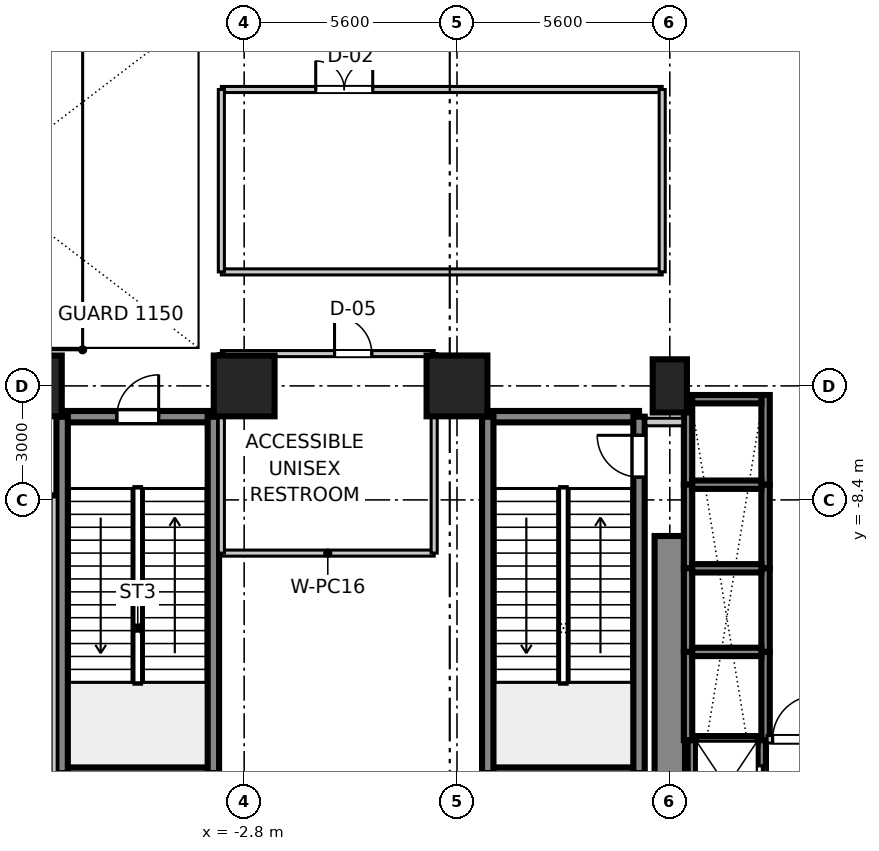
"""IFC4 building model, lengths in metres.
Left out: names, types, materials, properties, quantities, classifications, styles, units other than length and angle.
Written with IfcOpenShell. Run it as: python <this file> out.ifc"""

import sys

from ifc_helpers import new_model, si_unit, direction, frame, frame_2d, origin, origin_2d, place, context, subcontext, project, spatial, rectangle, extrude, source, transform, mapped, element, fill, save


model = new_model("IFC4")
c1 = context("Model", 3, precision=1e-05, world=origin(), true_north=direction((0.0, 1.0)))
c2 = subcontext(c1, "Body", "Model", "MODEL_VIEW")
j1 = project(units=[si_unit("LENGTHUNIT", "METRE"), si_unit("PLANEANGLEUNIT", "RADIAN")], contexts=[c1])
p1 = place(None, origin())
s1 = spatial("IfcSite", under=j1, at=p1, CompositionType="ELEMENT")
p2 = place(p1, origin())
s2 = spatial("IfcBuilding", under=s1, at=p2, CompositionType="ELEMENT")
p3 = place(p2, frame((0.0, 0.0, 5.4)))
s3 = spatial("IfcBuildingStorey", under=s2, at=p3, CompositionType="ELEMENT", Elevation=5.4)
m1 = source(origin(), c2, "Body", "SweptSolid", [
    extrude(rectangle(XDim=1.6, YDim=1.6, at=origin_2d()), origin(), (0.0, 0.0, 1.0), 5.355),
])
for number, where, z_axis, x_axis in (
    (1, (-8.4, -5.4, 0.0), (0.0, 0.0, 1.0), (1.0, 0.0, 0.0)),
    (2, (-2.8, -5.4, 0.0), (0.0, 0.0, 1.0), (1.0, 0.0, 0.0)),
    (3, (2.8, -5.4, 0.0), (0.0, 0.0, 1.0), (1.0, 0.0, 0.0)),
):
    element("IfcColumn", number, at=place(p3, frame(where, z_axis=z_axis, x_axis=x_axis)), inside=s3, PredefinedType="COLUMN", context=c2, shape_type="MappedRepresentation", body=[
        mapped(m1, transform((0.0, 0.0, 0.0), scale=1.0)),
    ])
m2 = source(origin(), c2, "Body", "SweptSolid", [
    extrude(rectangle(XDim=0.9, YDim=1.4, at=origin_2d()), origin(), (0.0, 0.0, 1.0), 5.355),
])
p4 = place(p3, frame((8.4, -5.4, 0.0), z_axis=(0.0, 0.0, 1.0), x_axis=(1.0, 0.0, 0.0)))
e4 = element("IfcColumn", 4, at=p4, inside=s3, PredefinedType="PILASTER", context=c2, shape_type="MappedRepresentation", body=[
    mapped(m2, transform((0.0, 0.0, 0.0), scale=1.0)),
])
m3 = source(origin(), c2, "Body", "SweptSolid", [
    extrude(rectangle(XDim=7.65, YDim=0.8, at=frame_2d((3.825, 0.0))), origin(), (0.0, 0.0, 1.0), 5.08),
])
p5 = place(p3, frame((8.4, -17.0, 0.0), z_axis=(0.0, 0.0, 1.0), x_axis=(0.0, 1.0, 0.0)))
e5 = element("IfcWall", 5, at=p5, inside=s3, PredefinedType="SHEAR", context=c2, shape_type="MappedRepresentation", body=[
    mapped(m3, transform((0.0, 0.0, 0.0), scale=1.0)),
])
m4 = source(origin(), c2, "Body", "SweptSolid", [
    extrude(rectangle(XDim=3.98, YDim=0.3, at=frame_2d((1.99, 0.0))), origin(), (0.0, 0.0, 1.0), 5.08),
])
for number, where, z_axis, x_axis in (
    (6, (3.61, -15.59, 0.0), (0.0, 0.0, 1.0), (1.0, 0.0, 0.0)),
    (7, (3.61, -6.21, 0.0), (0.0, 0.0, 1.0), (1.0, 0.0, 0.0)),
):
    element("IfcWall", number, at=place(p3, frame(where, z_axis=z_axis, x_axis=x_axis)), inside=s3, PredefinedType="SHEAR", context=c2, shape_type="MappedRepresentation", body=[
        mapped(m4, transform((0.0, 0.0, 0.0), scale=1.0)),
    ])
m5 = source(origin(), c2, "Body", "SweptSolid", [
    extrude(rectangle(XDim=9.38, YDim=0.3, at=frame_2d((4.69, 0.0))), origin(), (0.0, 0.0, 1.0), 5.08),
])
p6 = place(p3, frame((3.61, -15.59, 0.0), z_axis=(0.0, 0.0, 1.0), x_axis=(0.0, 1.0, 0.0)))
e8 = element("IfcWall", 8, at=p6, inside=s3, PredefinedType="SHEAR", context=c2, shape_type="MappedRepresentation", body=[
    mapped(m5, transform((0.0, 0.0, 0.0), scale=1.0)),
])
p7 = place(p3, frame((7.59, -15.59, 0.0), z_axis=(0.0, 0.0, 1.0), x_axis=(0.0, 1.0, 0.0)))
e9 = element("IfcWall", 9, at=p7, inside=s3, PredefinedType="SHEAR", context=c2, shape_type="MappedRepresentation", body=[
    mapped(m5, transform((0.0, 0.0, 0.0), scale=1.0)),
])
p8 = place(p7, frame((7.79, 0.0, 0.0)))
e10 = element("IfcOpeningElement", 10, at=p8, cuts=e9, PredefinedType="OPENING", context=c2, shape_type="SweptSolid", body=[
    extrude(rectangle(XDim=1.1, YDim=2.15, at=frame_2d((0.55, 1.075))), frame((0.0, 0.16, 0.0), z_axis=(0.0, -1.0, 0.0), x_axis=(1.0, 0.0, 0.0)), (0.0, 0.0, 1.0), 0.32),
])
p9 = place(p3, frame((-7.59, -15.59, 0.0), z_axis=(0.0, 0.0, 1.0), x_axis=(1.0, 0.0, 0.0)))
e11 = element("IfcWall", 11, at=p9, inside=s3, PredefinedType="SHEAR", context=c2, shape_type="MappedRepresentation", body=[
    mapped(m4, transform((0.0, 0.0, 0.0), scale=1.0)),
])
p10 = place(p3, frame((-7.59, -6.21, 0.0), z_axis=(0.0, 0.0, 1.0), x_axis=(1.0, 0.0, 0.0)))
e12 = element("IfcWall", 12, at=p10, inside=s3, PredefinedType="SHEAR", context=c2, shape_type="MappedRepresentation", body=[
    mapped(m4, transform((0.0, 0.0, 0.0), scale=1.0)),
])
p11 = place(p10, frame((1.44, 0.0, 0.0)))
e13 = element("IfcOpeningElement", 13, at=p11, cuts=e12, PredefinedType="OPENING", context=c2, shape_type="SweptSolid", body=[
    extrude(rectangle(XDim=1.1, YDim=2.15, at=frame_2d((0.55, 1.075))), frame((0.0, 0.16, 0.0), z_axis=(0.0, -1.0, 0.0), x_axis=(1.0, 0.0, 0.0)), (0.0, 0.0, 1.0), 0.32),
])
for number, where, z_axis, x_axis in (
    (14, (-7.59, -15.59, 0.0), (0.0, 0.0, 1.0), (0.0, 1.0, 0.0)),
    (15, (-3.61, -15.59, 0.0), (0.0, 0.0, 1.0), (0.0, 1.0, 0.0)),
):
    element("IfcWall", number, at=place(p3, frame(where, z_axis=z_axis, x_axis=x_axis)), inside=s3, PredefinedType="SHEAR", context=c2, shape_type="MappedRepresentation", body=[
        mapped(m5, transform((0.0, 0.0, 0.0), scale=1.0)),
    ])
m6 = source(origin(), c2, "Body", "SweptSolid", [
    extrude(rectangle(XDim=2.36, YDim=0.22, at=frame_2d((1.18, 0.0))), origin(), (0.0, 0.0, 1.0), 5.08),
])
for number, where, z_axis, x_axis in (
    (16, (8.88, -8.0, 0.0), (0.0, 0.0, 1.0), (0.0, 1.0, 0.0)),
    (17, (10.92, -8.0, 0.0), (0.0, 0.0, 1.0), (0.0, 1.0, 0.0)),
):
    element("IfcWall", number, at=place(p3, frame(where, z_axis=z_axis, x_axis=x_axis)), inside=s3, PredefinedType="SHEAR", context=c2, shape_type="MappedRepresentation", body=[
        mapped(m6, transform((0.0, 0.0, 0.0), scale=1.0)),
    ])
m7 = source(origin(), c2, "Body", "SweptSolid", [
    extrude(rectangle(XDim=1.82, YDim=0.22, at=frame_2d((0.91, 0.0))), origin(), (0.0, 0.0, 1.0), 5.08),
])
p12 = place(p3, frame((8.99, -5.75, 0.0), z_axis=(0.0, 0.0, 1.0), x_axis=(1.0, 0.0, 0.0)))
e18 = element("IfcWall", 18, at=p12, inside=s3, PredefinedType="SHEAR", context=c2, shape_type="MappedRepresentation", body=[
    mapped(m7, transform((0.0, 0.0, 0.0), scale=1.0)),
])
m8 = source(origin(), c2, "Body", "SweptSolid", [
    extrude(rectangle(XDim=2.2, YDim=0.22, at=frame_2d((1.1, 0.0))), origin(), (0.0, 0.0, 1.0), 5.08),
])
for number, where, z_axis, x_axis in (
    (19, (8.88, -10.2, 0.0), (0.0, 0.0, 1.0), (0.0, 1.0, 0.0)),
    (20, (10.92, -10.2, 0.0), (0.0, 0.0, 1.0), (0.0, 1.0, 0.0)),
):
    element("IfcWall", number, at=place(p3, frame(where, z_axis=z_axis, x_axis=x_axis)), inside=s3, PredefinedType="SHEAR", context=c2, shape_type="MappedRepresentation", body=[
        mapped(m8, transform((0.0, 0.0, 0.0), scale=1.0)),
    ])
m9 = source(origin(), c2, "Body", "SweptSolid", [
    extrude(rectangle(XDim=1.82, YDim=0.22, at=frame_2d((0.91, 0.0))), origin(), (0.0, 0.0, 1.0), 5.4),
])
p13 = place(p3, frame((8.99, -8.0, 0.0), z_axis=(0.0, 0.0, 1.0), x_axis=(1.0, 0.0, 0.0)))
e21 = element("IfcWall", 21, at=p13, inside=s3, PredefinedType="SHEAR", context=c2, shape_type="MappedRepresentation", body=[
    mapped(m9, transform((0.0, 0.0, 0.0), scale=1.0)),
])
for number, where, z_axis, x_axis in (
    (22, (8.88, -12.4, 0.0), (0.0, 0.0, 1.0), (0.0, 1.0, 0.0)),
    (23, (10.92, -12.4, 0.0), (0.0, 0.0, 1.0), (0.0, 1.0, 0.0)),
):
    element("IfcWall", number, at=place(p3, frame(where, z_axis=z_axis, x_axis=x_axis)), inside=s3, PredefinedType="SHEAR", context=c2, shape_type="MappedRepresentation", body=[
        mapped(m8, transform((0.0, 0.0, 0.0), scale=1.0)),
    ])
p14 = place(p3, frame((8.99, -10.2, 0.0), z_axis=(0.0, 0.0, 1.0), x_axis=(1.0, 0.0, 0.0)))
e24 = element("IfcWall", 24, at=p14, inside=s3, PredefinedType="SHEAR", context=c2, shape_type="MappedRepresentation", body=[
    mapped(m9, transform((0.0, 0.0, 0.0), scale=1.0)),
])
m10 = source(origin(), c2, "Body", "SweptSolid", [
    extrude(rectangle(XDim=2.325, YDim=0.22, at=frame_2d((1.163, 0.0))), origin(), (0.0, 0.0, 1.0), 5.08),
])
for number, where, z_axis, x_axis in (
    (25, (8.88, -14.725, 0.0), (0.0, 0.0, 1.0), (0.0, 1.0, 0.0)),
    (26, (10.92, -14.725, 0.0), (0.0, 0.0, 1.0), (0.0, 1.0, 0.0)),
):
    element("IfcWall", number, at=place(p3, frame(where, z_axis=z_axis, x_axis=x_axis)), inside=s3, PredefinedType="SHEAR", context=c2, shape_type="MappedRepresentation", body=[
        mapped(m10, transform((0.0, 0.0, 0.0), scale=1.0)),
    ])
p15 = place(p3, frame((8.99, -12.4, 0.0), z_axis=(0.0, 0.0, 1.0), x_axis=(1.0, 0.0, 0.0)))
e27 = element("IfcWall", 27, at=p15, inside=s3, PredefinedType="SHEAR", context=c2, shape_type="MappedRepresentation", body=[
    mapped(m9, transform((0.0, 0.0, 0.0), scale=1.0)),
])
m11 = source(origin(), c2, "Body", "SweptSolid", [
    extrude(rectangle(XDim=2.635, YDim=0.22, at=frame_2d((1.317, 0.0))), origin(), (0.0, 0.0, 1.0), 5.08),
])
p16 = place(p3, frame((8.98, -17.36, 0.0), z_axis=(0.0, 0.0, 1.0), x_axis=(0.0, 1.0, 0.0)))
e28 = element("IfcWall", 28, at=p16, inside=s3, PredefinedType="SHEAR", context=c2, shape_type="MappedRepresentation", body=[
    mapped(m11, transform((0.0, 0.0, 0.0), scale=1.0)),
])
p17 = place(p3, frame((10.82, -17.36, 0.0), z_axis=(0.0, 0.0, 1.0), x_axis=(0.0, 1.0, 0.0)))
e29 = element("IfcWall", 29, at=p17, inside=s3, PredefinedType="SHEAR", context=c2, shape_type="MappedRepresentation", body=[
    mapped(m11, transform((0.0, 0.0, 0.0), scale=1.0)),
])
p18 = place(p17, frame((0.86, 0.0, 0.0)))
e30 = element("IfcOpeningElement", 30, at=p18, cuts=e29, PredefinedType="OPENING", context=c2, shape_type="SweptSolid", body=[
    extrude(rectangle(XDim=1.1, YDim=2.2, at=frame_2d((0.55, 1.1))), frame((0.0, 0.12, 0.0), z_axis=(0.0, -1.0, 0.0), x_axis=(1.0, 0.0, 0.0)), (0.0, 0.0, 1.0), 0.24),
])
m12 = source(origin(), c2, "Body", "SweptSolid", [
    extrude(rectangle(XDim=1.62, YDim=0.22, at=frame_2d((0.81, 0.0))), origin(), (0.0, 0.0, 1.0), 5.4),
])
p19 = place(p3, frame((9.09, -14.725, 0.0), z_axis=(0.0, 0.0, 1.0), x_axis=(1.0, 0.0, 0.0)))
e31 = element("IfcWall", 31, at=p19, inside=s3, PredefinedType="SHEAR", context=c2, shape_type="MappedRepresentation", body=[
    mapped(m12, transform((0.0, 0.0, 0.0), scale=1.0)),
])
m13 = source(origin(), c2, "Body", "SweptSolid", [
    extrude(rectangle(XDim=1.46, YDim=0.2, at=frame_2d((0.73, 0.0))), origin(), (0.0, 0.0, 1.0), 3.4),
])
p20 = place(p3, frame((10.96, -14.7, 0.0), z_axis=(0.0, 0.0, 1.0), x_axis=(1.0, 0.0, 0.0)))
e32 = element("IfcWall", 32, at=p20, inside=s3, PredefinedType="PARTITIONING", context=c2, shape_type="MappedRepresentation", body=[
    mapped(m13, transform((0.0, 0.0, 0.0), scale=1.0)),
])
p21 = place(p20, frame((0.145, 0.0, 0.0)))
e33 = element("IfcOpeningElement", 33, at=p21, cuts=e32, PredefinedType="OPENING", context=c2, shape_type="SweptSolid", body=[
    extrude(rectangle(XDim=1.15, YDim=2.15, at=frame_2d((0.575, 1.075))), frame((0.0, 0.11, 0.0), z_axis=(0.0, -1.0, 0.0), x_axis=(1.0, 0.0, 0.0)), (0.0, 0.0, 1.0), 0.22),
])
m14 = source(origin(), c2, "Body", "SweptSolid", [
    extrude(rectangle(XDim=0.97, YDim=0.2, at=frame_2d((0.485, 0.0))), origin(), (0.0, 0.0, 1.0), 3.4),
])
p22 = place(p3, frame((7.77, -6.35, 0.0), z_axis=(0.0, 0.0, 1.0), x_axis=(1.0, 0.0, 0.0)))
e34 = element("IfcWall", 34, at=p22, inside=s3, PredefinedType="PARTITIONING", context=c2, shape_type="MappedRepresentation", body=[
    mapped(m14, transform((0.0, 0.0, 0.0), scale=1.0)),
])
m15 = source(origin(), c2, "Body", "SweptSolid", [
    extrude(rectangle(XDim=10.0, YDim=0.16, at=frame_2d((5.0, 0.0))), origin(), (0.0, 0.0, 1.0), 3.4),
])
p23 = place(p3, frame((-17.8, -8.32, 0.0), z_axis=(0.0, 0.0, 1.0), x_axis=(1.0, 0.0, 0.0)))
e35 = element("IfcWall", 35, at=p23, inside=s3, PredefinedType="PARTITIONING", context=c2, shape_type="MappedRepresentation", body=[
    mapped(m15, transform((0.0, 0.0, 0.0), scale=1.0)),
])
p24 = place(p23, frame((4.25, 0.0, 0.0)))
e36 = element("IfcOpeningElement", 36, at=p24, cuts=e35, PredefinedType="OPENING", context=c2, shape_type="SweptSolid", body=[
    extrude(rectangle(XDim=1.5, YDim=2.15, at=frame_2d((0.75, 1.075))), frame((0.0, 0.09, 0.0), z_axis=(0.0, -1.0, 0.0), x_axis=(1.0, 0.0, 0.0)), (0.0, 0.0, 1.0), 0.18),
])
m16 = source(origin(), c2, "Body", "SweptSolid", [
    extrude(rectangle(XDim=15.44, YDim=0.16, at=frame_2d((7.72, 0.0))), origin(), (0.0, 0.0, 1.0), 3.4),
])
p25 = place(p3, frame((-7.8, -23.76, 0.0), z_axis=(0.0, 0.0, 1.0), x_axis=(0.0, 1.0, 0.0)))
e37 = element("IfcWall", 37, at=p25, inside=s3, PredefinedType="PARTITIONING", context=c2, shape_type="MappedRepresentation", body=[
    mapped(m16, transform((0.0, 0.0, 0.0), scale=1.0)),
])
m17 = source(origin(), c2, "Body", "SweptSolid", [
    extrude(rectangle(XDim=11.6, YDim=0.16, at=frame_2d((5.8, 0.0))), origin(), (0.0, 0.0, 1.0), 3.4),
])
p26 = place(p3, frame((-3.4, -2.4, 0.0), z_axis=(0.0, 0.0, 1.0), x_axis=(1.0, 0.0, 0.0)))
e38 = element("IfcWall", 38, at=p26, inside=s3, PredefinedType="PARTITIONING", context=c2, shape_type="MappedRepresentation", body=[
    mapped(m17, transform((0.0, 0.0, 0.0), scale=1.0)),
])
p27 = place(p3, frame((-3.4, 2.4, 0.0), z_axis=(0.0, 0.0, 1.0), x_axis=(1.0, 0.0, 0.0)))
e39 = element("IfcWall", 39, at=p27, inside=s3, PredefinedType="PARTITIONING", context=c2, shape_type="MappedRepresentation", body=[
    mapped(m17, transform((0.0, 0.0, 0.0), scale=1.0)),
])
p28 = place(p27, frame((2.483, 0.0, 0.0)))
e40 = element("IfcOpeningElement", 40, at=p28, cuts=e39, PredefinedType="OPENING", context=c2, shape_type="SweptSolid", body=[
    extrude(rectangle(XDim=1.5, YDim=2.15, at=frame_2d((0.75, 1.075))), frame((0.0, 0.09, 0.0), z_axis=(0.0, -1.0, 0.0), x_axis=(1.0, 0.0, 0.0)), (0.0, 0.0, 1.0), 0.18),
])
m18 = source(origin(), c2, "Body", "SweptSolid", [
    extrude(rectangle(XDim=4.8, YDim=0.16, at=frame_2d((2.4, 0.0))), origin(), (0.0, 0.0, 1.0), 3.4),
])
for number, where, z_axis, x_axis in (
    (41, (-3.4, -2.4, 0.0), (0.0, 0.0, 1.0), (0.0, 1.0, 0.0)),
    (42, (8.2, -2.4, 0.0), (0.0, 0.0, 1.0), (0.0, 1.0, 0.0)),
):
    element("IfcWall", number, at=place(p3, frame(where, z_axis=z_axis, x_axis=x_axis)), inside=s3, PredefinedType="PARTITIONING", context=c2, shape_type="MappedRepresentation", body=[
        mapped(m18, transform((0.0, 0.0, 0.0), scale=1.0)),
    ])
m19 = source(origin(), c2, "Body", "SweptSolid", [
    extrude(rectangle(XDim=5.6, YDim=0.16, at=frame_2d((2.8, 0.0))), origin(), (0.0, 0.0, 1.0), 3.4),
])
p29 = place(p3, frame((-3.4, -9.8, 0.0), z_axis=(0.0, 0.0, 1.0), x_axis=(1.0, 0.0, 0.0)))
e43 = element("IfcWall", 43, at=p29, inside=s3, PredefinedType="PARTITIONING", context=c2, shape_type="MappedRepresentation", body=[
    mapped(m19, transform((0.0, 0.0, 0.0), scale=1.0)),
])
p30 = place(p3, frame((-3.4, -4.55, 0.0), z_axis=(0.0, 0.0, 1.0), x_axis=(1.0, 0.0, 0.0)))
e44 = element("IfcWall", 44, at=p30, inside=s3, PredefinedType="PARTITIONING", context=c2, shape_type="MappedRepresentation", body=[
    mapped(m19, transform((0.0, 0.0, 0.0), scale=1.0)),
])
p31 = place(p30, frame((2.978, 0.0, 0.0)))
e45 = element("IfcOpeningElement", 45, at=p31, cuts=e44, PredefinedType="OPENING", context=c2, shape_type="SweptSolid", body=[
    extrude(rectangle(XDim=0.98, YDim=2.1, at=frame_2d((0.49, 1.05))), frame((0.0, 0.09, 0.0), z_axis=(0.0, -1.0, 0.0), x_axis=(1.0, 0.0, 0.0)), (0.0, 0.0, 1.0), 0.18),
])
m20 = source(origin(), c2, "Body", "SweptSolid", [
    extrude(rectangle(XDim=5.25, YDim=0.16, at=frame_2d((2.625, 0.0))), origin(), (0.0, 0.0, 1.0), 3.4),
])
for number, where, z_axis, x_axis in (
    (46, (-3.4, -9.8, 0.0), (0.0, 0.0, 1.0), (0.0, 1.0, 0.0)),
    (47, (2.2, -9.8, 0.0), (0.0, 0.0, 1.0), (0.0, 1.0, 0.0)),
):
    element("IfcWall", number, at=place(p3, frame(where, z_axis=z_axis, x_axis=x_axis)), inside=s3, PredefinedType="PARTITIONING", context=c2, shape_type="MappedRepresentation", body=[
        mapped(m20, transform((0.0, 0.0, 0.0), scale=1.0)),
    ])
m21 = source(origin(), c2, "Body", "SweptSolid", [
    extrude(rectangle(XDim=1.1, YDim=2.15, at=frame_2d((0.55, 1.075))), frame((0.0, 0.025, 0.0), z_axis=(0.0, -1.0, 0.0), x_axis=(1.0, 0.0, 0.0)), (0.0, 0.0, 1.0), 0.05),
])
p32 = place(p8, origin())
e48 = element("IfcDoor", 48, at=p32, inside=s3, OperationType="SINGLE_SWING_RIGHT", PredefinedType="DOOR", context=c2, shape_type="MappedRepresentation", body=[
    mapped(m21, transform((0.0, 0.0, 0.0), scale=1.0)),
])
fill(e10, e48)
p33 = place(p11, frame((1.1, 0.0, 0.0), z_axis=(0.0, 0.0, 1.0), x_axis=(-1.0, 0.0, 0.0)))
e49 = element("IfcDoor", 49, at=p33, inside=s3, OperationType="SINGLE_SWING_RIGHT", PredefinedType="DOOR", context=c2, shape_type="MappedRepresentation", body=[
    mapped(m21, transform((0.0, 0.0, 0.0), scale=1.0)),
])
fill(e13, e49)
m22 = source(origin(), c2, "Body", "SweptSolid", [
    extrude(rectangle(XDim=1.1, YDim=2.2, at=frame_2d((0.55, 1.1))), frame((0.0, 0.025, 0.0), z_axis=(0.0, -1.0, 0.0), x_axis=(1.0, 0.0, 0.0)), (0.0, 0.0, 1.0), 0.05),
])
p34 = place(p18, frame((1.1, 0.0, 0.0), z_axis=(0.0, 0.0, 1.0), x_axis=(-1.0, 0.0, 0.0)))
e50 = element("IfcDoor", 50, at=p34, inside=s3, OperationType="DOUBLE_DOOR_SLIDING", PredefinedType="DOOR", context=c2, shape_type="MappedRepresentation", body=[
    mapped(m22, transform((0.0, 0.0, 0.0), scale=1.0)),
])
fill(e30, e50)
m23 = source(origin(), c2, "Body", "SweptSolid", [
    extrude(rectangle(XDim=1.15, YDim=2.15, at=frame_2d((0.575, 1.075))), frame((0.0, 0.025, 0.0), z_axis=(0.0, -1.0, 0.0), x_axis=(1.0, 0.0, 0.0)), (0.0, 0.0, 1.0), 0.05),
])
p35 = place(p21, origin())
e51 = element("IfcDoor", 51, at=p35, inside=s3, OperationType="SINGLE_SWING_RIGHT", PredefinedType="DOOR", context=c2, shape_type="MappedRepresentation", body=[
    mapped(m23, transform((0.0, 0.0, 0.0), scale=1.0)),
])
fill(e33, e51)
m24 = source(origin(), c2, "Body", "SweptSolid", [
    extrude(rectangle(XDim=1.5, YDim=2.15, at=frame_2d((0.75, 1.075))), frame((0.0, 0.025, 0.0), z_axis=(0.0, -1.0, 0.0), x_axis=(1.0, 0.0, 0.0)), (0.0, 0.0, 1.0), 0.05),
])
p36 = place(p28, frame((1.5, 0.0, 0.0), z_axis=(0.0, 0.0, 1.0), x_axis=(-1.0, 0.0, 0.0)))
e52 = element("IfcDoor", 52, at=p36, inside=s3, OperationType="DOUBLE_DOOR_SINGLE_SWING", PredefinedType="DOOR", context=c2, shape_type="MappedRepresentation", body=[
    mapped(m24, transform((0.0, 0.0, 0.0), scale=1.0)),
])
fill(e40, e52)
m25 = source(origin(), c2, "Body", "SweptSolid", [
    extrude(rectangle(XDim=0.98, YDim=2.1, at=frame_2d((0.49, 1.05))), frame((0.0, 0.025, 0.0), z_axis=(0.0, -1.0, 0.0), x_axis=(1.0, 0.0, 0.0)), (0.0, 0.0, 1.0), 0.05),
])
p37 = place(p31, frame((0.98, 0.0, 0.0), z_axis=(0.0, 0.0, 1.0), x_axis=(-1.0, 0.0, 0.0)))
e53 = element("IfcDoor", 53, at=p37, inside=s3, OperationType="SINGLE_SWING_LEFT", PredefinedType="DOOR", context=c2, shape_type="MappedRepresentation", body=[
    mapped(m25, transform((0.0, 0.0, 0.0), scale=1.0)),
])
fill(e45, e53)
save(model, sys.argv[1])
